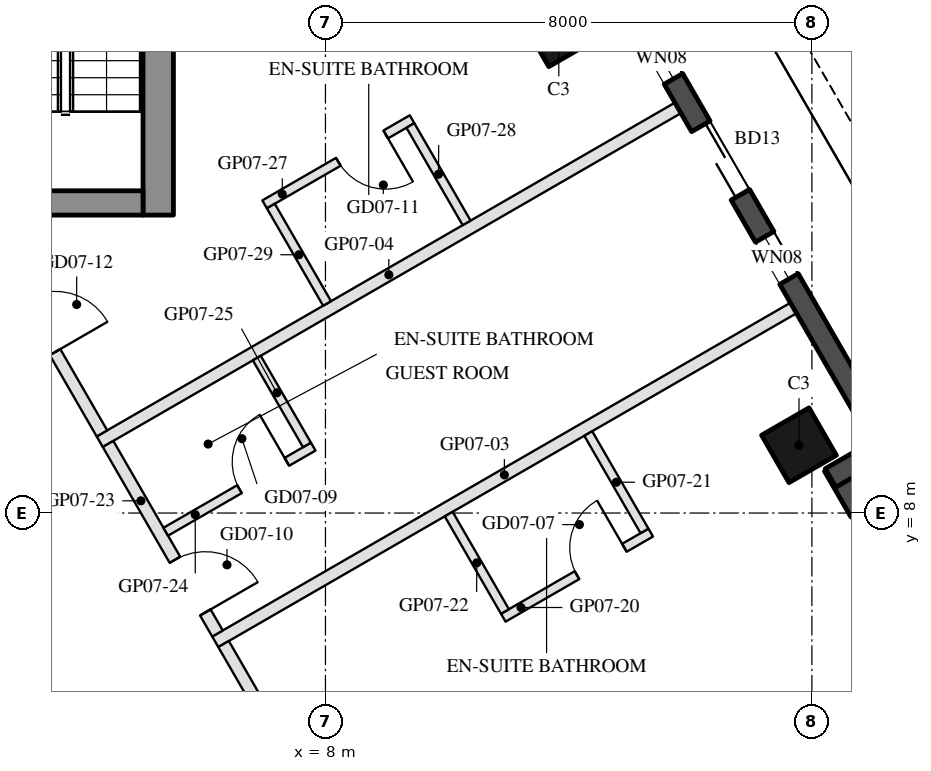
"""IFC4 building model, lengths in metres.
Left out: names, types, materials, properties, quantities, classifications, styles, units other than length and angle.
Written with IfcOpenShell. Run it as: python <this file> out.ifc"""

import sys

from ifc_helpers import new_model, si_unit, direction, frame, frame_2d, origin, origin_2d, place, context, subcontext, project, spatial, rectangle, hollow_rectangle, extrude, element, fill, save


model = new_model("IFC4")
c1 = context("Model", 3, precision=1e-05, world=origin(), true_north=direction((0.0, 1.0)))
c2 = subcontext(c1, "Body", "Model", "MODEL_VIEW")
j1 = project(units=[si_unit("LENGTHUNIT", "METRE"), si_unit("PLANEANGLEUNIT", "RADIAN")], contexts=[c1])
p1 = place(None, origin())
s1 = spatial("IfcSite", under=j1, at=p1, CompositionType="ELEMENT")
p2 = place(p1, origin())
s2 = spatial("IfcBuilding", under=s1, at=p2, CompositionType="ELEMENT")
p3 = place(p2, frame((0.0, 0.0, 94.6)))
s3 = spatial("IfcBuildingStorey", under=s2, at=p3, CompositionType="ELEMENT", Elevation=94.6)
for number, where, z_axis, x_axis in (
    (1, (15.788, 9.115, 0.0), (0.0, 0.0, 1.0), (-0.5, 0.866, 0.0)),
    (2, (11.838, 15.957, 0.0), (0.0, 0.0, 1.0), (-0.5, 0.866, 0.0)),
):
    element("IfcColumn", number, at=place(p3, frame(where, z_axis=z_axis, x_axis=x_axis)), inside=s3, PredefinedType="COLUMN", context=c2, shape_type="SweptSolid", body=[
        extrude(hollow_rectangle(XDim=0.9, YDim=0.9, WallThickness=0.04, at=origin_2d()), origin(), (0.0, 0.0, 1.0), 3.7),
    ])
p4 = place(p3, frame((19.729, 2.938, 0.0), z_axis=(0.0, 0.0, 1.0), x_axis=(-0.499976430342, 0.866039011305, 0.0)))
e3 = element("IfcWall", 3, at=p4, inside=s3, PredefinedType="SOLIDWALL", context=c2, shape_type="SweptSolid", body=[
    extrude(rectangle(XDim=6.74, YDim=0.35, at=frame_2d((3.37, 0.0))), origin(), (0.0, 0.0, 1.0), 3.55),
])
p5 = place(p4, frame((0.77, 0.0, 0.3)))
e4 = element("IfcOpeningElement", 4, at=p5, cuts=e3, PredefinedType="OPENING", context=c2, shape_type="SweptSolid", body=[
    extrude(rectangle(XDim=2.4, YDim=2.65, at=frame_2d((1.2, 1.325))), frame((0.0, 0.185, 0.0), z_axis=(0.0, -1.0, 0.0), x_axis=(1.0, 0.0, 0.0)), (0.0, 0.0, 1.0), 0.37),
])
p6 = place(p4, frame((3.47, 0.0, 0.3)))
e5 = element("IfcOpeningElement", 5, at=p6, cuts=e3, PredefinedType="OPENING", context=c2, shape_type="SweptSolid", body=[
    extrude(rectangle(XDim=2.4, YDim=2.65, at=frame_2d((1.2, 1.325))), frame((0.0, 0.185, 0.0), z_axis=(0.0, -1.0, 0.0), x_axis=(1.0, 0.0, 0.0)), (0.0, 0.0, 1.0), 0.37),
])
p7 = place(p3, frame((16.306, 8.577, 0.0), z_axis=(0.0, 0.0, 1.0), x_axis=(0.866092288191, 0.499884134912, 0.0)))
e6 = element("IfcWall", 6, at=p7, inside=s3, PredefinedType="SOLIDWALL", context=c2, shape_type="SweptSolid", body=[
    extrude(rectangle(XDim=1.22, YDim=0.35, at=frame_2d((0.61, 0.0))), origin(), (0.0, 0.0, 1.0), 3.55),
])
p8 = place(p3, frame((17.299, 8.948, 0.0), z_axis=(0.0, 0.0, 1.0), x_axis=(-0.500010041276, 0.866019606374, 0.0)))
e7 = element("IfcWall", 7, at=p8, inside=s3, PredefinedType="SOLIDWALL", context=c2, shape_type="SweptSolid", body=[
    extrude(rectangle(XDim=9.7, YDim=0.35, at=frame_2d((4.85, 0.0))), origin(), (0.0, 0.0, 1.0), 3.55),
])
p9 = place(p8, frame((3.351, 0.0, 0.3)))
e8 = element("IfcOpeningElement", 8, at=p9, cuts=e7, PredefinedType="OPENING", context=c2, shape_type="SweptSolid", body=[
    extrude(rectangle(XDim=0.8, YDim=2.65, at=frame_2d((0.4, 1.325))), frame((0.0, 0.185, 0.0), z_axis=(0.0, -1.0, 0.0), x_axis=(1.0, 0.0, 0.0)), (0.0, 0.0, 1.0), 0.37),
])
p10 = place(p8, frame((4.95, 0.0, 0.0)))
e9 = element("IfcOpeningElement", 9, at=p10, cuts=e7, PredefinedType="OPENING", context=c2, shape_type="SweptSolid", body=[
    extrude(rectangle(XDim=1.3, YDim=2.4, at=frame_2d((0.65, 1.2))), frame((0.0, 0.185, 0.0), z_axis=(0.0, -1.0, 0.0), x_axis=(1.0, 0.0, 0.0)), (0.0, 0.0, 1.0), 0.37),
])
p11 = place(p8, frame((7.15, 0.0, 0.3)))
e10 = element("IfcOpeningElement", 10, at=p11, cuts=e7, PredefinedType="OPENING", context=c2, shape_type="SweptSolid", body=[
    extrude(rectangle(XDim=0.8, YDim=2.65, at=frame_2d((0.4, 1.325))), frame((0.0, 0.185, 0.0), z_axis=(0.0, -1.0, 0.0), x_axis=(1.0, 0.0, 0.0)), (0.0, 0.0, 1.0), 0.37),
])
p12 = place(p3, frame((5.25, 12.9, 0.0), z_axis=(0.0, 0.0, 1.0), x_axis=(0.0, 1.0, 0.0)))
e11 = element("IfcWall", 11, at=p12, inside=s3, PredefinedType="SHEAR", context=c2, shape_type="SweptSolid", body=[
    extrude(rectangle(XDim=14.837, YDim=0.5, at=frame_2d((7.418, 0.0))), origin(), (0.0, 0.0, 1.0), 3.5),
])
p13 = place(p3, frame((5.0, 13.1, 0.0), z_axis=(0.0, 0.0, 1.0), x_axis=(-1.0, 0.0, 0.0)))
e12 = element("IfcWall", 12, at=p13, inside=s3, PredefinedType="SHEAR", context=c2, shape_type="SweptSolid", body=[
    extrude(rectangle(XDim=10.0, YDim=0.4, at=frame_2d((5.0, 0.0))), origin(), (0.0, 0.0, 1.0), 3.5),
])
p14 = place(p13, frame((3.55, 0.0, 0.0)))
e13 = element("IfcOpeningElement", 13, at=p14, cuts=e12, PredefinedType="OPENING", context=c2, shape_type="SweptSolid", body=[
    extrude(rectangle(XDim=1.1, YDim=2.1, at=frame_2d((0.55, 1.05))), frame((0.0, 0.21, 0.0), z_axis=(0.0, -1.0, 0.0), x_axis=(1.0, 0.0, 0.0)), (0.0, 0.0, 1.0), 0.42),
])
p15 = place(p13, frame((5.85, 0.0, 0.0)))
e14 = element("IfcOpeningElement", 14, at=p15, cuts=e12, PredefinedType="OPENING", context=c2, shape_type="SweptSolid", body=[
    extrude(rectangle(XDim=1.4, YDim=2.1, at=frame_2d((0.7, 1.05))), frame((0.0, 0.21, 0.0), z_axis=(0.0, -1.0, 0.0), x_axis=(1.0, 0.0, 0.0)), (0.0, 0.0, 1.0), 0.42),
])
for number, where, z_axis, x_axis in (
    (15, (15.697, 11.372, 0.0), (0.0, 0.0, 1.0), (-0.866, -0.5, 0.0)),
    (16, (13.797, 14.663, 0.0), (0.0, 0.0, 1.0), (-0.866, -0.5, 0.0)),
):
    element("IfcWall", number, at=place(p3, frame(where, z_axis=z_axis, x_axis=x_axis)), inside=s3, PredefinedType="PARTITIONING", context=c2, shape_type="SweptSolid", body=[
        extrude(rectangle(XDim=10.98, YDim=0.2, at=frame_2d((5.49, 0.0))), origin(), (0.0, 0.0, 1.0), 2.96),
    ])
p16 = place(p3, frame((6.325, 5.845, 0.0), z_axis=(0.0, 0.0, 1.0), x_axis=(0.500002143212, -0.866024166397, 0.0)))
e17 = element("IfcWall", 17, at=p16, inside=s3, PredefinedType="PARTITIONING", context=c2, shape_type="SweptSolid", body=[
    extrude(rectangle(XDim=11.888, YDim=0.2, at=frame_2d((5.944, 0.0))), origin(), (0.0, 0.0, 1.0), 2.95),
])
p17 = place(p16, frame((5.444, 0.0, 0.0)))
e18 = element("IfcOpeningElement", 18, at=p17, cuts=e17, PredefinedType="OPENING", context=c2, shape_type="SweptSolid", body=[
    extrude(rectangle(XDim=1.0, YDim=2.1, at=frame_2d((0.5, 1.05))), frame((0.0, 0.11, 0.0), z_axis=(0.0, -1.0, 0.0), x_axis=(1.0, 0.0, 0.0)), (0.0, 0.0, 1.0), 0.22),
])
p18 = place(p3, frame((10.924, 6.278, 0.0), z_axis=(0.0, 0.0, 1.0), x_axis=(0.866056369097, 0.49994636267, 0.0)))
e19 = element("IfcWall", 19, at=p18, inside=s3, PredefinedType="PARTITIONING", context=c2, shape_type="SweptSolid", body=[
    extrude(rectangle(XDim=2.8, YDim=0.15, at=frame_2d((1.4, 0.0))), origin(), (0.0, 0.0, 1.0), 2.95),
])
p19 = place(p18, frame((1.4, 0.0, 0.0)))
e20 = element("IfcOpeningElement", 20, at=p19, cuts=e19, PredefinedType="OPENING", context=c2, shape_type="SweptSolid", body=[
    extrude(rectangle(XDim=0.9, YDim=2.1, at=frame_2d((0.45, 1.05))), frame((0.0, 0.085, 0.0), z_axis=(0.0, -1.0, 0.0), x_axis=(1.0, 0.0, 0.0)), (0.0, 0.0, 1.0), 0.17),
])
for number, where, z_axis, x_axis in (
    (21, (13.247, 7.706, 0.0), (0.0, 0.0, 1.0), (-0.5, 0.866, 0.0)),
    (22, (10.952, 6.381, 0.0), (0.0, 0.0, 1.0), (-0.5, 0.866, 0.0)),
):
    element("IfcWall", number, at=place(p3, frame(where, z_axis=z_axis, x_axis=x_axis)), inside=s3, PredefinedType="PARTITIONING", context=c2, shape_type="SweptSolid", body=[
        extrude(rectangle(XDim=1.85, YDim=0.15, at=frame_2d((0.925, 0.0))), origin(), (0.0, 0.0, 1.0), 2.95),
    ])
p20 = place(p3, frame((4.425, 9.136, 0.0), z_axis=(0.0, 0.0, 1.0), x_axis=(0.500041424909, -0.866001485781, 0.0)))
e23 = element("IfcWall", 23, at=p20, inside=s3, PredefinedType="PARTITIONING", context=c2, shape_type="SweptSolid", body=[
    extrude(rectangle(XDim=3.6, YDim=0.2, at=frame_2d((1.8, 0.0))), origin(), (0.0, 0.0, 1.0), 2.95),
])
p21 = place(p20, frame((2.2, 0.0, 0.0)))
e24 = element("IfcOpeningElement", 24, at=p21, cuts=e23, PredefinedType="OPENING", context=c2, shape_type="SweptSolid", body=[
    extrude(rectangle(XDim=1.0, YDim=2.1, at=frame_2d((0.5, 1.05))), frame((0.0, 0.11, 0.0), z_axis=(0.0, -1.0, 0.0), x_axis=(1.0, 0.0, 0.0)), (0.0, 0.0, 1.0), 0.22),
])
p22 = place(p3, frame((5.374, 7.692, 0.0), z_axis=(0.0, 0.0, 1.0), x_axis=(0.865996816683, 0.500049511043, 0.0)))
e25 = element("IfcWall", 25, at=p22, inside=s3, PredefinedType="PARTITIONING", context=c2, shape_type="SweptSolid", body=[
    extrude(rectangle(XDim=2.8, YDim=0.15, at=frame_2d((1.4, 0.0))), origin(), (0.0, 0.0, 1.0), 2.95),
])
p23 = place(p22, frame((1.4, 0.0, 0.0)))
e26 = element("IfcOpeningElement", 26, at=p23, cuts=e25, PredefinedType="OPENING", context=c2, shape_type="SweptSolid", body=[
    extrude(rectangle(XDim=0.9, YDim=2.1, at=frame_2d((0.45, 1.05))), frame((0.0, 0.085, 0.0), z_axis=(0.0, -1.0, 0.0), x_axis=(1.0, 0.0, 0.0)), (0.0, 0.0, 1.0), 0.17),
])
p24 = place(p3, frame((7.696, 9.12, 0.0), z_axis=(0.0, 0.0, 1.0), x_axis=(-0.499974350878, 0.866040211805, 0.0)))
e27 = element("IfcWall", 27, at=p24, inside=s3, PredefinedType="PARTITIONING", context=c2, shape_type="SweptSolid", body=[
    extrude(rectangle(XDim=1.65, YDim=0.15, at=frame_2d((0.825, 0.0))), origin(), (0.0, 0.0, 1.0), 2.95),
])
p25 = place(p3, frame((2.281, 12.85, 0.0), z_axis=(0.0, 0.0, 1.0), x_axis=(0.500011931275, -0.86601851515, 0.0)))
e28 = element("IfcWall", 28, at=p25, inside=s3, PredefinedType="PARTITIONING", context=c2, shape_type="SweptSolid", body=[
    extrude(rectangle(XDim=4.088, YDim=0.2, at=frame_2d((2.044, 0.0))), origin(), (0.0, 0.0, 1.0), 2.95),
])
p26 = place(p25, frame((1.544, 0.0, 0.0)))
e29 = element("IfcOpeningElement", 29, at=p26, cuts=e28, PredefinedType="OPENING", context=c2, shape_type="SweptSolid", body=[
    extrude(rectangle(XDim=1.0, YDim=2.1, at=frame_2d((0.5, 1.05))), frame((0.0, 0.11, 0.0), z_axis=(0.0, -1.0, 0.0), x_axis=(1.0, 0.0, 0.0)), (0.0, 0.0, 1.0), 0.22),
])
p27 = place(p3, frame((9.424, 14.477, 0.0), z_axis=(0.0, 0.0, 1.0), x_axis=(-0.866034573852, -0.49998411664, 0.0)))
e30 = element("IfcWall", 30, at=p27, inside=s3, PredefinedType="PARTITIONING", context=c2, shape_type="SweptSolid", body=[
    extrude(rectangle(XDim=2.8, YDim=0.15, at=frame_2d((1.4, 0.0))), origin(), (0.0, 0.0, 1.0), 2.95),
])
p28 = place(p27, frame((0.5, 0.0, 0.0)))
e31 = element("IfcOpeningElement", 31, at=p28, cuts=e30, PredefinedType="OPENING", context=c2, shape_type="SweptSolid", body=[
    extrude(rectangle(XDim=0.9, YDim=2.1, at=frame_2d((0.45, 1.05))), frame((0.0, 0.085, 0.0), z_axis=(0.0, -1.0, 0.0), x_axis=(1.0, 0.0, 0.0)), (0.0, 0.0, 1.0), 0.17),
])
for number, where, z_axis, x_axis in (
    (32, (10.322, 12.772, 0.0), (0.0, 0.0, 1.0), (-0.5, 0.866, 0.0)),
    (33, (8.027, 11.447, 0.0), (0.0, 0.0, 1.0), (-0.5, 0.866, 0.0)),
):
    element("IfcWall", number, at=place(p3, frame(where, z_axis=z_axis, x_axis=x_axis)), inside=s3, PredefinedType="PARTITIONING", context=c2, shape_type="SweptSolid", body=[
        extrude(rectangle(XDim=1.85, YDim=0.15, at=frame_2d((0.925, 0.0))), origin(), (0.0, 0.0, 1.0), 3.55),
    ])
p29 = place(p9, origin())
e34 = element("IfcWindow", 34, at=p29, inside=s3, PartitioningType="SINGLE_PANEL", PredefinedType="WINDOW", context=c2, shape_type="SweptSolid", body=[
    extrude(rectangle(XDim=0.8, YDim=2.65, at=frame_2d((0.4, 1.325))), frame((0.0, 0.03, 0.0), z_axis=(0.0, -1.0, 0.0), x_axis=(1.0, 0.0, 0.0)), (0.0, 0.0, 1.0), 0.06),
])
fill(e8, e34)
p30 = place(p10, frame((1.3, 0.0, 0.0), z_axis=(0.0, 0.0, 1.0), x_axis=(-1.0, 0.0, 0.0)))
e35 = element("IfcDoor", 35, at=p30, inside=s3, OperationType="SLIDING_TO_LEFT", PredefinedType="DOOR", context=c2, shape_type="SweptSolid", body=[
    extrude(rectangle(XDim=1.3, YDim=2.4, at=frame_2d((0.65, 1.2))), frame((0.0, 0.025, 0.0), z_axis=(0.0, -1.0, 0.0), x_axis=(1.0, 0.0, 0.0)), (0.0, 0.0, 1.0), 0.05),
])
fill(e9, e35)
p31 = place(p11, origin())
e36 = element("IfcWindow", 36, at=p31, inside=s3, PartitioningType="SINGLE_PANEL", PredefinedType="WINDOW", context=c2, shape_type="SweptSolid", body=[
    extrude(rectangle(XDim=0.8, YDim=2.65, at=frame_2d((0.4, 1.325))), frame((0.0, 0.03, 0.0), z_axis=(0.0, -1.0, 0.0), x_axis=(1.0, 0.0, 0.0)), (0.0, 0.0, 1.0), 0.06),
])
fill(e10, e36)
p32 = place(p19, origin())
e37 = element("IfcDoor", 37, at=p32, inside=s3, OperationType="SINGLE_SWING_RIGHT", PredefinedType="DOOR", context=c2, shape_type="SweptSolid", body=[
    extrude(rectangle(XDim=0.9, YDim=2.1, at=frame_2d((0.45, 1.05))), frame((0.0, 0.025, 0.0), z_axis=(0.0, -1.0, 0.0), x_axis=(1.0, 0.0, 0.0)), (0.0, 0.0, 1.0), 0.05),
])
fill(e20, e37)
p33 = place(p23, origin())
e38 = element("IfcDoor", 38, at=p33, inside=s3, OperationType="SINGLE_SWING_RIGHT", PredefinedType="DOOR", context=c2, shape_type="SweptSolid", body=[
    extrude(rectangle(XDim=0.9, YDim=2.1, at=frame_2d((0.45, 1.05))), frame((0.0, 0.025, 0.0), z_axis=(0.0, -1.0, 0.0), x_axis=(1.0, 0.0, 0.0)), (0.0, 0.0, 1.0), 0.05),
])
fill(e26, e38)
p34 = place(p21, origin())
e39 = element("IfcDoor", 39, at=p34, inside=s3, OperationType="SINGLE_SWING_RIGHT", PredefinedType="DOOR", context=c2, shape_type="SweptSolid", body=[
    extrude(rectangle(XDim=1.0, YDim=2.1, at=frame_2d((0.5, 1.05))), frame((0.0, 0.025, 0.0), z_axis=(0.0, -1.0, 0.0), x_axis=(1.0, 0.0, 0.0)), (0.0, 0.0, 1.0), 0.05),
])
fill(e24, e39)
p35 = place(p28, origin())
e40 = element("IfcDoor", 40, at=p35, inside=s3, OperationType="SINGLE_SWING_LEFT", PredefinedType="DOOR", context=c2, shape_type="SweptSolid", body=[
    extrude(rectangle(XDim=0.9, YDim=2.1, at=frame_2d((0.45, 1.05))), frame((0.0, 0.025, 0.0), z_axis=(0.0, -1.0, 0.0), x_axis=(1.0, 0.0, 0.0)), (0.0, 0.0, 1.0), 0.05),
])
fill(e31, e40)
p36 = place(p26, origin())
e41 = element("IfcDoor", 41, at=p36, inside=s3, OperationType="SINGLE_SWING_RIGHT", PredefinedType="DOOR", context=c2, shape_type="SweptSolid", body=[
    extrude(rectangle(XDim=1.0, YDim=2.1, at=frame_2d((0.5, 1.05))), frame((0.0, 0.025, 0.0), z_axis=(0.0, -1.0, 0.0), x_axis=(1.0, 0.0, 0.0)), (0.0, 0.0, 1.0), 0.05),
])
fill(e29, e41)
save(model, sys.argv[1])
